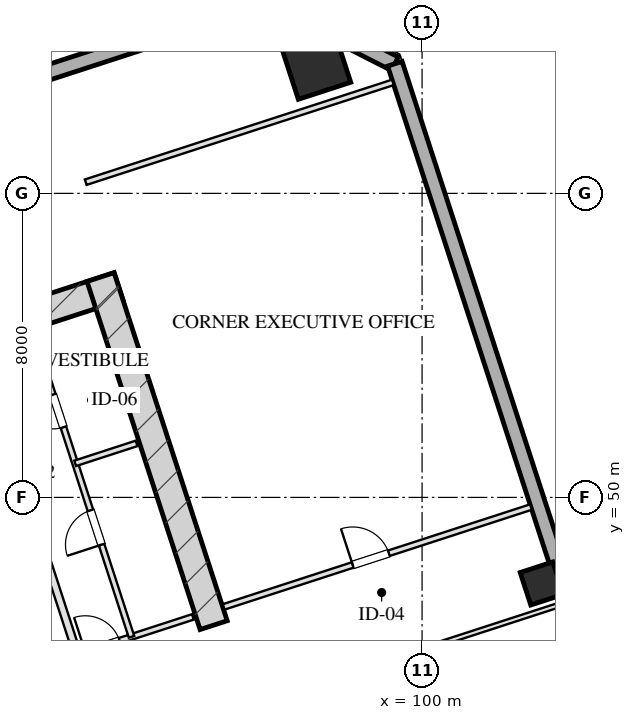
"""IFC4 building model, lengths in metres.
Left out: names, types, materials, properties, quantities, classifications, styles, units other than length and angle.
Written with IfcOpenShell. Run it as: python <this file> out.ifc"""

import sys

from ifc_helpers import new_model, si_unit, direction, frame, frame_2d, origin, origin_2d, place, context, subcontext, project, spatial, rectangle, hollow_rectangle, extrude, element, fill, save


model = new_model("IFC4")
c1 = context("Model", 3, precision=1e-05, world=origin(), true_north=direction((0.0, 1.0)))
c2 = subcontext(c1, "Body", "Model", "MODEL_VIEW")
j1 = project(units=[si_unit("LENGTHUNIT", "METRE"), si_unit("PLANEANGLEUNIT", "RADIAN")], contexts=[c1])
p1 = place(None, origin())
s1 = spatial("IfcSite", under=j1, at=p1, CompositionType="ELEMENT")
p2 = place(p1, origin())
s2 = spatial("IfcBuilding", under=s1, at=p2, CompositionType="ELEMENT")
p3 = place(p2, frame((0.0, 0.0, 85.1)))
s3 = spatial("IfcBuildingStorey", under=s2, at=p3, CompositionType="ELEMENT", Elevation=85.1)
p4 = place(p3, frame((76.272, 50.443, 0.0), z_axis=(0.0, 0.0, 1.0), x_axis=(0.951056072937, 0.309018358888, 0.0)))
e1 = element("IfcWall", 1, at=p4, inside=s3, PredefinedType="SHEAR", context=c2, shape_type="SweptSolid", body=[
    extrude(rectangle(XDim=16.55, YDim=0.75, at=frame_2d((8.275, 0.0))), origin(), (0.0, 0.0, 1.0), 3.45),
])
p5 = place(p3, frame((94.515, 46.639, 0.0), z_axis=(0.0, 0.0, 1.0), x_axis=(-0.309016134813, 0.951056795583, 0.0)))
e2 = element("IfcWall", 2, at=p5, inside=s3, PredefinedType="SHEAR", context=c2, shape_type="SweptSolid", body=[
    extrude(rectangle(XDim=9.63, YDim=0.75, at=frame_2d((4.815, 0.0))), origin(), (0.0, 0.0, 1.0), 3.45),
])
p6 = place(p3, frame((97.209, 61.388, 0.0), z_axis=(0.0, 0.0, 1.0), x_axis=(0.951056516295, 0.309016994375, 0.0)))
e3 = element("IfcColumn", 3, at=p6, inside=s3, PredefinedType="COLUMN", context=c2, shape_type="SweptSolid", body=[
    extrude(hollow_rectangle(XDim=1.45, YDim=1.45, WallThickness=0.05, at=origin_2d()), origin(), (0.0, 0.0, 1.0), 3.451),
])
p7 = place(p3, frame((103.149, 47.736, 0.0), z_axis=(0.0, 0.0, 1.0), x_axis=(0.951056516295, 0.309016994375, 0.0)))
e4 = element("IfcColumn", 4, at=p7, inside=s3, PredefinedType="COLUMN", context=c2, shape_type="SweptSolid", body=[
    extrude(hollow_rectangle(XDim=0.9, YDim=0.9, WallThickness=0.032, at=origin_2d()), origin(), (0.0, 0.0, 1.0), 3.451),
])
p8 = place(p3, frame((68.047, 53.995, 0.0), z_axis=(0.0, 0.0, 1.0), x_axis=(0.95105505922, 0.309021478754, 0.0)))
e5 = element("IfcWall", 5, at=p8, inside=s3, PredefinedType="SOLIDWALL", context=c2, shape_type="SweptSolid", body=[
    extrude(rectangle(XDim=29.4, YDim=0.4, at=frame_2d((14.7, 0.0))), origin(), (0.0, 0.0, 1.0), 2.61),
])
p9 = place(p3, frame((96.008, 63.08, 0.0), z_axis=(0.0, 0.0, 1.0), x_axis=(0.891001999643, -0.45399937955, 0.0)))
e6 = element("IfcWall", 6, at=p9, inside=s3, PredefinedType="SOLIDWALL", context=c2, shape_type="SweptSolid", body=[
    extrude(rectangle(XDim=3.677, YDim=0.4, at=frame_2d((1.839, 0.0))), origin(), (0.0, 0.0, 1.0), 2.61),
])
p10 = place(p3, frame((99.284, 61.41, 0.0), z_axis=(0.0, 0.0, 1.0), x_axis=(0.309017542002, -0.95105633836, 0.0)))
e7 = element("IfcWall", 7, at=p10, inside=s3, PredefinedType="SOLIDWALL", context=c2, shape_type="SweptSolid", body=[
    extrude(rectangle(XDim=46.4, YDim=0.4, at=frame_2d((23.2, 0.0))), origin(), (0.0, 0.0, 1.0), 2.61),
])
p11 = place(p10, frame((28.4, 0.0, 0.75)))
e8 = element("IfcOpeningElement", 8, at=p11, cuts=e7, PredefinedType="OPENING", context=c2, shape_type="SweptSolid", body=[
    extrude(rectangle(XDim=2.4, YDim=1.46, at=frame_2d((1.2, 0.73))), frame((0.0, 0.21, 0.0), z_axis=(0.0, -1.0, 0.0), x_axis=(1.0, 0.0, 0.0)), (0.0, 0.0, 1.0), 0.42),
])
p12 = place(p10, frame((19.4, 0.0, 0.75)))
e9 = element("IfcOpeningElement", 9, at=p12, cuts=e7, PredefinedType="OPENING", context=c2, shape_type="SweptSolid", body=[
    extrude(rectangle(XDim=2.4, YDim=1.46, at=frame_2d((1.2, 0.73))), frame((0.0, 0.21, 0.0), z_axis=(0.0, -1.0, 0.0), x_axis=(1.0, 0.0, 0.0)), (0.0, 0.0, 1.0), 0.42),
])
p13 = place(p10, frame((15.6, 0.0, 0.75)))
e10 = element("IfcOpeningElement", 10, at=p13, cuts=e7, PredefinedType="OPENING", context=c2, shape_type="SweptSolid", body=[
    extrude(rectangle(XDim=2.4, YDim=1.46, at=frame_2d((1.2, 0.73))), frame((0.0, 0.21, 0.0), z_axis=(0.0, -1.0, 0.0), x_axis=(1.0, 0.0, 0.0)), (0.0, 0.0, 1.0), 0.42),
])
p14 = place(p3, frame((90.928, 45.868, 0.0), z_axis=(0.0, 0.0, 1.0), x_axis=(-0.309042196757, 0.951048327176, 0.0)))
e11 = element("IfcWall", 11, at=p14, inside=s3, PredefinedType="PARTITIONING", context=c2, shape_type="SweptSolid", body=[
    extrude(rectangle(XDim=8.43, YDim=0.2, at=frame_2d((4.215, 0.0))), origin(), (0.0, 0.0, 1.0), 3.175),
])
p15 = place(p3, frame((90.928, 45.868, 0.0), z_axis=(0.0, 0.0, 1.0), x_axis=(0.951059297078, 0.309008435874, 0.0)))
e12 = element("IfcWall", 12, at=p15, inside=s3, PredefinedType="PARTITIONING", context=c2, shape_type="SweptSolid", body=[
    extrude(rectangle(XDim=3.2, YDim=0.15, at=frame_2d((1.6, 0.0))), origin(), (0.0, 0.0, 1.0), 3.175),
])
p16 = place(p15, frame((0.22, 0.0, 0.0)))
e13 = element("IfcOpeningElement", 13, at=p16, cuts=e12, PredefinedType="OPENING", context=c2, shape_type="SweptSolid", body=[
    extrude(rectangle(XDim=0.95, YDim=2.05, at=frame_2d((0.475, 1.025))), frame((0.0, 0.085, 0.0), z_axis=(0.0, -1.0, 0.0), x_axis=(1.0, 0.0, 0.0)), (0.0, 0.0, 1.0), 0.17),
])
p17 = place(p3, frame((92.355, 46.331, 0.0), z_axis=(0.0, 0.0, 1.0), x_axis=(-0.309007490203, 0.951059604335, 0.0)))
e14 = element("IfcWall", 14, at=p17, inside=s3, PredefinedType="PARTITIONING", context=c2, shape_type="SweptSolid", body=[
    extrude(rectangle(XDim=8.43, YDim=0.15, at=frame_2d((4.215, 0.0))), origin(), (0.0, 0.0, 1.0), 3.175),
])
p18 = place(p17, frame((2.55, 0.0, 0.0)))
e15 = element("IfcOpeningElement", 15, at=p18, cuts=e14, PredefinedType="OPENING", context=c2, shape_type="SweptSolid", body=[
    extrude(rectangle(XDim=0.95, YDim=2.05, at=frame_2d((0.475, 1.025))), frame((0.0, 0.085, 0.0), z_axis=(0.0, -1.0, 0.0), x_axis=(1.0, 0.0, 0.0)), (0.0, 0.0, 1.0), 0.17),
])
p19 = place(p17, frame((5.8, 0.0, 0.0)))
e16 = element("IfcOpeningElement", 16, at=p19, cuts=e14, PredefinedType="OPENING", context=c2, shape_type="SweptSolid", body=[
    extrude(rectangle(XDim=0.9, YDim=2.05, at=frame_2d((0.45, 1.025))), frame((0.0, 0.085, 0.0), z_axis=(0.0, -1.0, 0.0), x_axis=(1.0, 0.0, 0.0)), (0.0, 0.0, 1.0), 0.17),
])
p20 = place(p3, frame((90.871, 50.896, 0.0), z_axis=(0.0, 0.0, 1.0), x_axis=(0.951054116971, 0.309024378638, 0.0)))
e17 = element("IfcWall", 17, at=p20, inside=s3, PredefinedType="PARTITIONING", context=c2, shape_type="SweptSolid", body=[
    extrude(rectangle(XDim=1.7, YDim=0.15, at=frame_2d((0.85, 0.0))), origin(), (0.0, 0.0, 1.0), 3.175),
])
p21 = place(p3, frame((91.149, 58.294, 0.0), z_axis=(0.0, 0.0, 1.0), x_axis=(0.951062770994, 0.308997743729, 0.0)))
e18 = element("IfcWall", 18, at=p21, inside=s3, PredefinedType="PARTITIONING", context=c2, shape_type="SweptSolid", body=[
    extrude(rectangle(XDim=8.5, YDim=0.15, at=frame_2d((4.25, 0.0))), origin(), (0.0, 0.0, 1.0), 3.175),
])
p22 = place(p3, frame((94.78, 47.119, 0.0), z_axis=(0.0, 0.0, 1.0), x_axis=(0.951054329824, 0.309023723562, 0.0)))
e19 = element("IfcWall", 19, at=p22, inside=s3, PredefinedType="PARTITIONING", context=c2, shape_type="SweptSolid", body=[
    extrude(rectangle(XDim=8.5, YDim=0.15, at=frame_2d((4.25, 0.0))), origin(), (0.0, 0.0, 1.0), 3.175),
])
p23 = place(p22, frame((3.57, 0.0, 0.0)))
e20 = element("IfcOpeningElement", 20, at=p23, cuts=e19, PredefinedType="OPENING", context=c2, shape_type="SweptSolid", body=[
    extrude(rectangle(XDim=1.0, YDim=2.05, at=frame_2d((0.5, 1.025))), frame((0.0, 0.085, 0.0), z_axis=(0.0, -1.0, 0.0), x_axis=(1.0, 0.0, 0.0)), (0.0, 0.0, 1.0), 0.17),
])
p24 = place(p3, frame((92.826, 43.667, 0.0), z_axis=(0.0, 0.0, 1.0), x_axis=(0.951057778088, 0.309013110947, 0.0)))
e21 = element("IfcWall", 21, at=p24, inside=s3, PredefinedType="PARTITIONING", context=c2, shape_type="SweptSolid", body=[
    extrude(rectangle(XDim=11.425, YDim=0.12, at=frame_2d((5.712, 0.0))), origin(), (0.0, 0.0, 1.0), 3.175),
])
p25 = place(p16, origin())
e22 = element("IfcDoor", 22, at=p25, inside=s3, OperationType="SINGLE_SWING_LEFT", PredefinedType="DOOR", context=c2, shape_type="SweptSolid", body=[
    extrude(rectangle(XDim=0.95, YDim=2.05, at=frame_2d((0.475, 1.025))), frame((0.0, 0.025, 0.0), z_axis=(0.0, -1.0, 0.0), x_axis=(1.0, 0.0, 0.0)), (0.0, 0.0, 1.0), 0.05),
])
fill(e13, e22)
p26 = place(p18, origin())
e23 = element("IfcDoor", 23, at=p26, inside=s3, OperationType="SINGLE_SWING_LEFT", PredefinedType="DOOR", context=c2, shape_type="SweptSolid", body=[
    extrude(rectangle(XDim=0.95, YDim=2.05, at=frame_2d((0.475, 1.025))), frame((0.0, 0.025, 0.0), z_axis=(0.0, -1.0, 0.0), x_axis=(1.0, 0.0, 0.0)), (0.0, 0.0, 1.0), 0.05),
])
fill(e15, e23)
p27 = place(p19, origin())
e24 = element("IfcDoor", 24, at=p27, inside=s3, OperationType="SINGLE_SWING_RIGHT", PredefinedType="DOOR", context=c2, shape_type="SweptSolid", body=[
    extrude(rectangle(XDim=0.9, YDim=2.05, at=frame_2d((0.45, 1.025))), frame((0.0, 0.025, 0.0), z_axis=(0.0, -1.0, 0.0), x_axis=(1.0, 0.0, 0.0)), (0.0, 0.0, 1.0), 0.05),
])
fill(e16, e24)
p28 = place(p23, origin())
e25 = element("IfcDoor", 25, at=p28, inside=s3, OperationType="SINGLE_SWING_LEFT", PredefinedType="DOOR", context=c2, shape_type="SweptSolid", body=[
    extrude(rectangle(XDim=1.0, YDim=2.05, at=frame_2d((0.5, 1.025))), frame((0.0, 0.025, 0.0), z_axis=(0.0, -1.0, 0.0), x_axis=(1.0, 0.0, 0.0)), (0.0, 0.0, 1.0), 0.05),
])
fill(e20, e25)
save(model, sys.argv[1])
